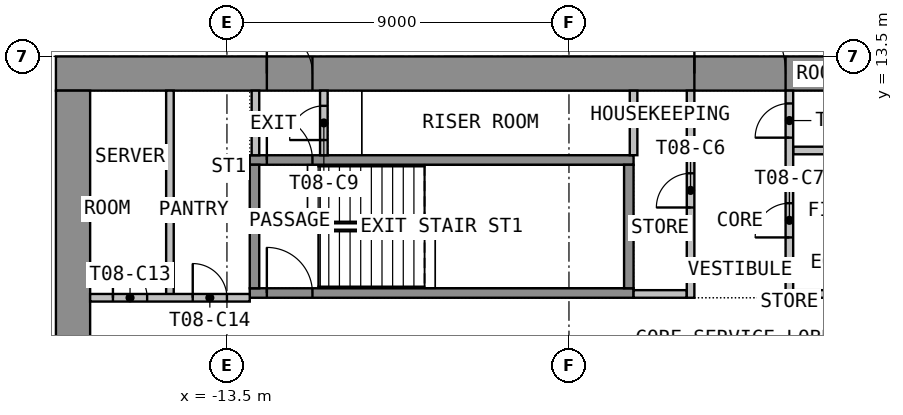
"""IFC4 building model, lengths in metres.
Left out: names, types, materials, properties, quantities, classifications, styles, units other than length and angle.
Written with IfcOpenShell. Run it as: python <this file> out.ifc"""

import sys

from ifc_helpers import new_model, si_unit, direction, frame, frame_2d, origin, place, context, subcontext, project, spatial, rectangle, extrude, element, fill, save


model = new_model("IFC4")
c1 = context("Model", 3, precision=1e-05, world=origin(), true_north=direction((0.0, 1.0)))
c2 = subcontext(c1, "Body", "Model", "MODEL_VIEW")
j1 = project(units=[si_unit("LENGTHUNIT", "METRE"), si_unit("PLANEANGLEUNIT", "RADIAN")], contexts=[c1])
p1 = place(None, origin())
s1 = spatial("IfcSite", under=j1, at=p1, CompositionType="ELEMENT")
p2 = place(p1, origin())
s2 = spatial("IfcBuilding", under=s1, at=p2, CompositionType="ELEMENT")
p3 = place(p2, frame((0.0, 0.0, 116.4)))
s3 = spatial("IfcBuildingStorey", under=s2, at=p3, CompositionType="ELEMENT", Elevation=116.4)
p4 = place(p3, frame((-18.0, 13.05, 0.0), z_axis=(0.0, 0.0, 1.0), x_axis=(1.0, 0.0, 0.0)))
e1 = element("IfcWall", 1, at=p4, inside=s3, PredefinedType="SHEAR", context=c2, shape_type="SweptSolid", body=[
    extrude(rectangle(XDim=36.0, YDim=0.9, at=frame_2d((18.0, 0.0))), origin(), (0.0, 0.0, 1.0), 3.525),
])
p5 = place(p4, frame((16.8, 0.0, 0.0)))
e2 = element("IfcOpeningElement", 2, at=p5, cuts=e1, PredefinedType="OPENING", context=c2, shape_type="SweptSolid", body=[
    extrude(rectangle(XDim=2.4, YDim=2.1, at=frame_2d((1.2, 1.05))), frame((0.0, 0.46, 0.0), z_axis=(0.0, -1.0, 0.0), x_axis=(1.0, 0.0, 0.0)), (0.0, 0.0, 1.0), 0.92),
])
p6 = place(p4, frame((5.55, 0.0, 0.0)))
e3 = element("IfcOpeningElement", 3, at=p6, cuts=e1, PredefinedType="OPENING", context=c2, shape_type="SweptSolid", body=[
    extrude(rectangle(XDim=1.2, YDim=2.1, at=frame_2d((0.6, 1.05))), frame((0.0, 0.46, 0.0), z_axis=(0.0, -1.0, 0.0), x_axis=(1.0, 0.0, 0.0)), (0.0, 0.0, 1.0), 0.92),
])
p7 = place(p4, frame((29.25, 0.0, 0.0)))
e4 = element("IfcOpeningElement", 4, at=p7, cuts=e1, PredefinedType="OPENING", context=c2, shape_type="SweptSolid", body=[
    extrude(rectangle(XDim=1.2, YDim=2.1, at=frame_2d((0.6, 1.05))), frame((0.0, 0.46, 0.0), z_axis=(0.0, -1.0, 0.0), x_axis=(1.0, 0.0, 0.0)), (0.0, 0.0, 1.0), 0.92),
])
p8 = place(p3, frame((-17.55, -12.6, 0.0), z_axis=(0.0, 0.0, 1.0), x_axis=(0.0, 1.0, 0.0)))
e5 = element("IfcWall", 5, at=p8, inside=s3, PredefinedType="SHEAR", context=c2, shape_type="SweptSolid", body=[
    extrude(rectangle(XDim=25.2, YDim=0.9, at=frame_2d((12.6, 0.0))), origin(), (0.0, 0.0, 1.0), 3.525),
])
p9 = place(p8, frame((11.4, 0.0, 0.0)))
e6 = element("IfcOpeningElement", 6, at=p9, cuts=e5, PredefinedType="OPENING", context=c2, shape_type="SweptSolid", body=[
    extrude(rectangle(XDim=2.4, YDim=2.1, at=frame_2d((1.2, 1.05))), frame((0.0, 0.46, 0.0), z_axis=(0.0, -1.0, 0.0), x_axis=(1.0, 0.0, 0.0)), (0.0, 0.0, 1.0), 0.92),
])
p10 = place(p3, frame((-12.9, 7.275, 0.0), z_axis=(0.0, 0.0, 1.0), x_axis=(1.0, 0.0, 0.0)))
e7 = element("IfcWall", 7, at=p10, inside=s3, PredefinedType="SHEAR", context=c2, shape_type="SweptSolid", body=[
    extrude(rectangle(XDim=10.1, YDim=0.25, at=frame_2d((5.05, 0.0))), origin(), (0.0, 0.0, 1.0), 3.525),
])
p11 = place(p10, frame((0.45, 0.0, 0.0)))
e8 = element("IfcOpeningElement", 8, at=p11, cuts=e7, PredefinedType="OPENING", context=c2, shape_type="SweptSolid", body=[
    extrude(rectangle(XDim=1.2, YDim=2.1, at=frame_2d((0.6, 1.05))), frame((0.0, 0.135, 0.0), z_axis=(0.0, -1.0, 0.0), x_axis=(1.0, 0.0, 0.0)), (0.0, 0.0, 1.0), 0.27),
])
p12 = place(p3, frame((-12.9, 10.775, 0.0), z_axis=(0.0, 0.0, 1.0), x_axis=(1.0, 0.0, 0.0)))
e9 = element("IfcWall", 9, at=p12, inside=s3, PredefinedType="SHEAR", context=c2, shape_type="SweptSolid", body=[
    extrude(rectangle(XDim=10.1, YDim=0.25, at=frame_2d((5.05, 0.0))), origin(), (0.0, 0.0, 1.0), 3.525),
])
p13 = place(p12, frame((0.45, 0.0, 0.0)))
e10 = element("IfcOpeningElement", 10, at=p13, cuts=e9, PredefinedType="OPENING", context=c2, shape_type="SweptSolid", body=[
    extrude(rectangle(XDim=1.2, YDim=2.1, at=frame_2d((0.6, 1.05))), frame((0.0, 0.135, 0.0), z_axis=(0.0, -1.0, 0.0), x_axis=(1.0, 0.0, 0.0)), (0.0, 0.0, 1.0), 0.27),
])
for number, where, z_axis, x_axis in (
    (11, (-12.775, 7.4, 0.0), (0.0, 0.0, 1.0), (0.0, 1.0, 0.0)),
    (12, (-2.925, 7.4, 0.0), (0.0, 0.0, 1.0), (0.0, 1.0, 0.0)),
):
    element("IfcWall", number, at=place(p3, frame(where, z_axis=z_axis, x_axis=x_axis)), inside=s3, PredefinedType="SHEAR", context=c2, shape_type="SweptSolid", body=[
        extrude(rectangle(XDim=3.25, YDim=0.25, at=frame_2d((1.625, 0.0))), origin(), (0.0, 0.0, 1.0), 3.525),
    ])
for number, where, z_axis, x_axis in (
    (13, (-2.8, 7.25, 0.0), (0.0, 0.0, 1.0), (1.0, 0.0, 0.0)),
    (14, (1.4, 7.25, 0.0), (0.0, 0.0, 1.0), (1.0, 0.0, 0.0)),
    (15, (1.4, 11.025, 0.0), (0.0, 0.0, 1.0), (1.0, 0.0, 0.0)),
):
    element("IfcWall", number, at=place(p3, frame(where, z_axis=z_axis, x_axis=x_axis)), inside=s3, PredefinedType="PARTITIONING", context=c2, shape_type="SweptSolid", body=[
        extrude(rectangle(XDim=1.4, YDim=0.2, at=frame_2d((0.7, 0.0))), origin(), (0.0, 0.0, 1.0), 3.525),
    ])
p14 = place(p3, frame((-1.3, 7.15, 0.0), z_axis=(0.0, 0.0, 1.0), x_axis=(0.0, 1.0, 0.0)))
e16 = element("IfcWall", 16, at=p14, inside=s3, PredefinedType="PARTITIONING", context=c2, shape_type="SweptSolid", body=[
    extrude(rectangle(XDim=5.45, YDim=0.2, at=frame_2d((2.725, 0.0))), origin(), (0.0, 0.0, 1.0), 3.525),
])
p15 = place(p14, frame((2.375, 0.0, 0.0)))
e17 = element("IfcOpeningElement", 17, at=p15, cuts=e16, PredefinedType="OPENING", context=c2, shape_type="SweptSolid", body=[
    extrude(rectangle(XDim=0.9, YDim=2.1, at=frame_2d((0.45, 1.05))), frame((0.0, 0.11, 0.0), z_axis=(0.0, -1.0, 0.0), x_axis=(1.0, 0.0, 0.0)), (0.0, 0.0, 1.0), 0.22),
])
p16 = place(p3, frame((1.3, 7.15, 0.0), z_axis=(0.0, 0.0, 1.0), x_axis=(0.0, 1.0, 0.0)))
e18 = element("IfcWall", 18, at=p16, inside=s3, PredefinedType="PARTITIONING", context=c2, shape_type="SweptSolid", body=[
    extrude(rectangle(XDim=5.45, YDim=0.2, at=frame_2d((2.725, 0.0))), origin(), (0.0, 0.0, 1.0), 3.525),
])
p17 = place(p16, frame((1.587, 0.0, 0.0)))
e19 = element("IfcOpeningElement", 19, at=p17, cuts=e18, PredefinedType="OPENING", context=c2, shape_type="SweptSolid", body=[
    extrude(rectangle(XDim=0.9, YDim=2.1, at=frame_2d((0.45, 1.05))), frame((0.0, 0.11, 0.0), z_axis=(0.0, -1.0, 0.0), x_axis=(1.0, 0.0, 0.0)), (0.0, 0.0, 1.0), 0.22),
])
p18 = place(p16, frame((4.212, 0.0, 0.0)))
e20 = element("IfcOpeningElement", 20, at=p18, cuts=e18, PredefinedType="OPENING", context=c2, shape_type="SweptSolid", body=[
    extrude(rectangle(XDim=0.9, YDim=2.1, at=frame_2d((0.45, 1.05))), frame((0.0, 0.11, 0.0), z_axis=(0.0, -1.0, 0.0), x_axis=(1.0, 0.0, 0.0)), (0.0, 0.0, 1.0), 0.22),
])
p19 = place(p3, frame((-12.75, 10.9, 0.0), z_axis=(0.0, 0.0, 1.0), x_axis=(0.0, 1.0, 0.0)))
e21 = element("IfcWall", 21, at=p19, inside=s3, PredefinedType="PARTITIONING", context=c2, shape_type="SweptSolid", body=[
    extrude(rectangle(XDim=1.7, YDim=0.2, at=frame_2d((0.85, 0.0))), origin(), (0.0, 0.0, 1.0), 3.525),
])
p20 = place(p3, frame((-10.95, 10.9, 0.0), z_axis=(0.0, 0.0, 1.0), x_axis=(0.0, 1.0, 0.0)))
e22 = element("IfcWall", 22, at=p20, inside=s3, PredefinedType="PARTITIONING", context=c2, shape_type="SweptSolid", body=[
    extrude(rectangle(XDim=1.7, YDim=0.2, at=frame_2d((0.85, 0.0))), origin(), (0.0, 0.0, 1.0), 3.525),
])
p21 = place(p20, frame((0.4, 0.0, 0.0)))
e23 = element("IfcOpeningElement", 23, at=p21, cuts=e22, PredefinedType="OPENING", context=c2, shape_type="SweptSolid", body=[
    extrude(rectangle(XDim=0.9, YDim=2.1, at=frame_2d((0.45, 1.05))), frame((0.0, 0.11, 0.0), z_axis=(0.0, -1.0, 0.0), x_axis=(1.0, 0.0, 0.0)), (0.0, 0.0, 1.0), 0.22),
])
p22 = place(p3, frame((-15.0, 7.15, 0.0), z_axis=(0.0, 0.0, 1.0), x_axis=(0.0, 1.0, 0.0)))
e24 = element("IfcWall", 24, at=p22, inside=s3, PredefinedType="PARTITIONING", context=c2, shape_type="SweptSolid", body=[
    extrude(rectangle(XDim=5.45, YDim=0.2, at=frame_2d((2.725, 0.0))), origin(), (0.0, 0.0, 1.0), 3.525),
])
p23 = place(p3, frame((-17.1, 7.15, 0.0), z_axis=(0.0, 0.0, 1.0), x_axis=(1.0, 0.0, 0.0)))
e25 = element("IfcWall", 25, at=p23, inside=s3, PredefinedType="PARTITIONING", context=c2, shape_type="SweptSolid", body=[
    extrude(rectangle(XDim=4.2, YDim=0.2, at=frame_2d((2.1, 0.0))), origin(), (0.0, 0.0, 1.0), 3.525),
])
p24 = place(p23, frame((0.6, 0.0, 0.0)))
e26 = element("IfcOpeningElement", 26, at=p24, cuts=e25, PredefinedType="OPENING", context=c2, shape_type="SweptSolid", body=[
    extrude(rectangle(XDim=0.9, YDim=2.1, at=frame_2d((0.45, 1.05))), frame((0.0, 0.11, 0.0), z_axis=(0.0, -1.0, 0.0), x_axis=(1.0, 0.0, 0.0)), (0.0, 0.0, 1.0), 0.22),
])
p25 = place(p23, frame((2.7, 0.0, 0.0)))
e27 = element("IfcOpeningElement", 27, at=p25, cuts=e25, PredefinedType="OPENING", context=c2, shape_type="SweptSolid", body=[
    extrude(rectangle(XDim=0.9, YDim=2.1, at=frame_2d((0.45, 1.05))), frame((0.0, 0.11, 0.0), z_axis=(0.0, -1.0, 0.0), x_axis=(1.0, 0.0, 0.0)), (0.0, 0.0, 1.0), 0.22),
])
p26 = place(p3, frame((-2.8, 10.901, 0.0), z_axis=(0.0, 0.0, 1.0), x_axis=(0.0, 1.0, 0.0)))
e28 = element("IfcWall", 28, at=p26, inside=s3, PredefinedType="PARTITIONING", context=c2, shape_type="SweptSolid", body=[
    extrude(rectangle(XDim=1.698, YDim=0.2, at=frame_2d((0.849, 0.0))), origin(), (0.0, 0.0, 1.0), 3.525),
])
p27 = place(p5, origin())
e29 = element("IfcDoor", 29, at=p27, inside=s3, OperationType="DOUBLE_DOOR_DOUBLE_SWING", PredefinedType="DOOR", context=c2, shape_type="SweptSolid", body=[
    extrude(rectangle(XDim=2.4, YDim=2.1, at=frame_2d((1.2, 1.05))), frame((0.0, 0.025, 0.0), z_axis=(0.0, -1.0, 0.0), x_axis=(1.0, 0.0, 0.0)), (0.0, 0.0, 1.0), 0.05),
])
fill(e2, e29)
p28 = place(p6, origin())
e30 = element("IfcDoor", 30, at=p28, inside=s3, OperationType="SINGLE_SWING_RIGHT", PredefinedType="DOOR", context=c2, shape_type="SweptSolid", body=[
    extrude(rectangle(XDim=1.2, YDim=2.1, at=frame_2d((0.6, 1.05))), frame((0.0, 0.025, 0.0), z_axis=(0.0, -1.0, 0.0), x_axis=(1.0, 0.0, 0.0)), (0.0, 0.0, 1.0), 0.05),
])
fill(e3, e30)
p29 = place(p11, origin())
e31 = element("IfcDoor", 31, at=p29, inside=s3, OperationType="SINGLE_SWING_LEFT", PredefinedType="DOOR", context=c2, shape_type="SweptSolid", body=[
    extrude(rectangle(XDim=1.2, YDim=2.1, at=frame_2d((0.6, 1.05))), frame((0.0, 0.025, 0.0), z_axis=(0.0, -1.0, 0.0), x_axis=(1.0, 0.0, 0.0)), (0.0, 0.0, 1.0), 0.05),
])
fill(e8, e31)
p30 = place(p15, origin())
e32 = element("IfcDoor", 32, at=p30, inside=s3, OperationType="SINGLE_SWING_LEFT", PredefinedType="DOOR", context=c2, shape_type="SweptSolid", body=[
    extrude(rectangle(XDim=0.9, YDim=2.1, at=frame_2d((0.45, 1.05))), frame((0.0, 0.025, 0.0), z_axis=(0.0, -1.0, 0.0), x_axis=(1.0, 0.0, 0.0)), (0.0, 0.0, 1.0), 0.05),
])
fill(e17, e32)
p31 = place(p17, origin())
e33 = element("IfcDoor", 33, at=p31, inside=s3, OperationType="SINGLE_SWING_LEFT", PredefinedType="DOOR", context=c2, shape_type="SweptSolid", body=[
    extrude(rectangle(XDim=0.9, YDim=2.1, at=frame_2d((0.45, 1.05))), frame((0.0, 0.025, 0.0), z_axis=(0.0, -1.0, 0.0), x_axis=(1.0, 0.0, 0.0)), (0.0, 0.0, 1.0), 0.05),
])
fill(e19, e33)
p32 = place(p18, origin())
e34 = element("IfcDoor", 34, at=p32, inside=s3, OperationType="SINGLE_SWING_LEFT", PredefinedType="DOOR", context=c2, shape_type="SweptSolid", body=[
    extrude(rectangle(XDim=0.9, YDim=2.1, at=frame_2d((0.45, 1.05))), frame((0.0, 0.025, 0.0), z_axis=(0.0, -1.0, 0.0), x_axis=(1.0, 0.0, 0.0)), (0.0, 0.0, 1.0), 0.05),
])
fill(e20, e34)
p33 = place(p13, origin())
e35 = element("IfcDoor", 35, at=p33, inside=s3, OperationType="SINGLE_SWING_RIGHT", PredefinedType="DOOR", context=c2, shape_type="SweptSolid", body=[
    extrude(rectangle(XDim=1.2, YDim=2.1, at=frame_2d((0.6, 1.05))), frame((0.0, 0.025, 0.0), z_axis=(0.0, -1.0, 0.0), x_axis=(1.0, 0.0, 0.0)), (0.0, 0.0, 1.0), 0.05),
])
fill(e10, e35)
p34 = place(p21, origin())
e36 = element("IfcDoor", 36, at=p34, inside=s3, OperationType="SINGLE_SWING_LEFT", PredefinedType="DOOR", context=c2, shape_type="SweptSolid", body=[
    extrude(rectangle(XDim=0.9, YDim=2.1, at=frame_2d((0.45, 1.05))), frame((0.0, 0.025, 0.0), z_axis=(0.0, -1.0, 0.0), x_axis=(1.0, 0.0, 0.0)), (0.0, 0.0, 1.0), 0.05),
])
fill(e23, e36)
p35 = place(p24, origin())
e37 = element("IfcDoor", 37, at=p35, inside=s3, OperationType="SINGLE_SWING_LEFT", PredefinedType="DOOR", context=c2, shape_type="SweptSolid", body=[
    extrude(rectangle(XDim=0.9, YDim=2.1, at=frame_2d((0.45, 1.05))), frame((0.0, 0.025, 0.0), z_axis=(0.0, -1.0, 0.0), x_axis=(1.0, 0.0, 0.0)), (0.0, 0.0, 1.0), 0.05),
])
fill(e26, e37)
p36 = place(p25, origin())
e38 = element("IfcDoor", 38, at=p36, inside=s3, OperationType="SINGLE_SWING_LEFT", PredefinedType="DOOR", context=c2, shape_type="SweptSolid", body=[
    extrude(rectangle(XDim=0.9, YDim=2.1, at=frame_2d((0.45, 1.05))), frame((0.0, 0.025, 0.0), z_axis=(0.0, -1.0, 0.0), x_axis=(1.0, 0.0, 0.0)), (0.0, 0.0, 1.0), 0.05),
])
fill(e27, e38)
save(model, sys.argv[1])
